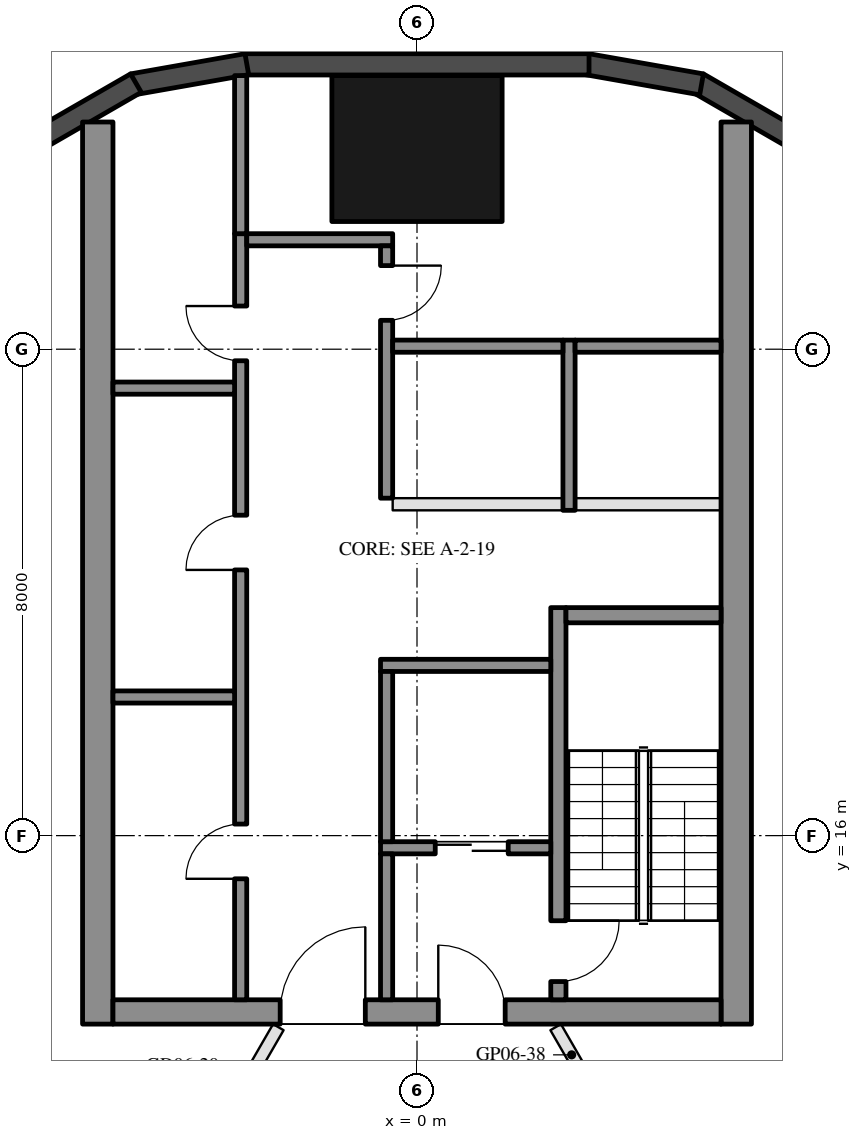
"""IFC4 building model, lengths in metres.
Left out: names, types, materials, properties, quantities, classifications, styles, units other than length and angle.
Written with IfcOpenShell. Run it as: python <this file> out.ifc"""

import sys

from ifc_helpers import new_model, si_unit, direction, frame, frame_2d, origin, origin_2d, place, context, subcontext, project, spatial, rectangle, hollow_rectangle, extrude, element, fill, save


model = new_model("IFC4")
c1 = context("Model", 3, precision=1e-05, world=origin(), true_north=direction((0.0, 1.0)))
c2 = subcontext(c1, "Body", "Model", "MODEL_VIEW")
j1 = project(units=[si_unit("LENGTHUNIT", "METRE"), si_unit("PLANEANGLEUNIT", "RADIAN")], contexts=[c1])
p1 = place(None, origin())
s1 = spatial("IfcSite", under=j1, at=p1, CompositionType="ELEMENT")
p2 = place(p1, origin())
s2 = spatial("IfcBuilding", under=s1, at=p2, CompositionType="ELEMENT")
p3 = place(p2, frame((0.0, 0.0, 90.9)))
s3 = spatial("IfcBuildingStorey", under=s2, at=p3, CompositionType="ELEMENT", Elevation=90.9)
p4 = place(p3, frame((0.0, 27.3, 0.0), z_axis=(0.0, 0.0, 1.0), x_axis=(1.0, 0.0, 0.0)))
e1 = element("IfcColumn", 1, at=p4, inside=s3, PredefinedType="COLUMN", context=c2, shape_type="SweptSolid", body=[
    extrude(hollow_rectangle(XDim=2.8, YDim=2.4, WallThickness=0.07, at=origin_2d()), origin(), (0.0, 0.0, 1.0), 3.7),
])
for number, where, z_axis, x_axis in (
    (2, (6.277, 27.422, 0.0), (0.0, 0.0, 1.0), (-0.866, 0.5, 0.0)),
    (3, (4.68, 28.356, 0.0), (0.0, 0.0, 1.0), (-0.985, 0.174, 0.0)),
):
    element("IfcWall", number, at=place(p3, frame(where, z_axis=z_axis, x_axis=x_axis)), inside=s3, PredefinedType="SOLIDWALL", context=c2, shape_type="SweptSolid", body=[
        extrude(rectangle(XDim=1.91, YDim=0.35, at=frame_2d((0.955, 0.0))), origin(), (0.0, 0.0, 1.0), 3.55),
    ])
p5 = place(p3, frame((2.829, 28.685, 0.0), z_axis=(0.0, 0.0, 1.0), x_axis=(-1.0, 0.0, 0.0)))
e4 = element("IfcWall", 4, at=p5, inside=s3, PredefinedType="SOLIDWALL", context=c2, shape_type="SweptSolid", body=[
    extrude(rectangle(XDim=5.658, YDim=0.35, at=frame_2d((2.829, 0.0))), origin(), (0.0, 0.0, 1.0), 3.55),
])
for number, where, z_axis, x_axis in (
    (5, (-2.799, 28.688, 0.0), (0.0, 0.0, 1.0), (-0.985, -0.174, 0.0)),
    (6, (-4.623, 28.377, 0.0), (0.0, 0.0, 1.0), (-0.866, -0.5, 0.0)),
):
    element("IfcWall", number, at=place(p3, frame(where, z_axis=z_axis, x_axis=x_axis)), inside=s3, PredefinedType="SOLIDWALL", context=c2, shape_type="SweptSolid", body=[
        extrude(rectangle(XDim=1.91, YDim=0.35, at=frame_2d((0.955, 0.0))), origin(), (0.0, 0.0, 1.0), 3.55),
    ])
for number, where, z_axis, x_axis in (
    (7, (5.25, 12.9, 0.0), (0.0, 0.0, 1.0), (0.0, 1.0, 0.0)),
    (8, (-5.25, 12.9, 0.0), (0.0, 0.0, 1.0), (0.0, 1.0, 0.0)),
):
    element("IfcWall", number, at=place(p3, frame(where, z_axis=z_axis, x_axis=x_axis)), inside=s3, PredefinedType="SHEAR", context=c2, shape_type="SweptSolid", body=[
        extrude(rectangle(XDim=14.837, YDim=0.5, at=frame_2d((7.418, 0.0))), origin(), (0.0, 0.0, 1.0), 3.5),
    ])
p6 = place(p3, frame((5.0, 13.1, 0.0), z_axis=(0.0, 0.0, 1.0), x_axis=(-1.0, 0.0, 0.0)))
e9 = element("IfcWall", 9, at=p6, inside=s3, PredefinedType="SHEAR", context=c2, shape_type="SweptSolid", body=[
    extrude(rectangle(XDim=10.0, YDim=0.4, at=frame_2d((5.0, 0.0))), origin(), (0.0, 0.0, 1.0), 3.5),
])
p7 = place(p6, frame((3.55, 0.0, 0.0)))
e10 = element("IfcOpeningElement", 10, at=p7, cuts=e9, PredefinedType="OPENING", context=c2, shape_type="SweptSolid", body=[
    extrude(rectangle(XDim=1.1, YDim=2.1, at=frame_2d((0.55, 1.05))), frame((0.0, 0.21, 0.0), z_axis=(0.0, -1.0, 0.0), x_axis=(1.0, 0.0, 0.0)), (0.0, 0.0, 1.0), 0.42),
])
p8 = place(p6, frame((5.85, 0.0, 0.0)))
e11 = element("IfcOpeningElement", 11, at=p8, cuts=e9, PredefinedType="OPENING", context=c2, shape_type="SweptSolid", body=[
    extrude(rectangle(XDim=1.4, YDim=2.1, at=frame_2d((0.7, 1.05))), frame((0.0, 0.21, 0.0), z_axis=(0.0, -1.0, 0.0), x_axis=(1.0, 0.0, 0.0)), (0.0, 0.0, 1.0), 0.42),
])
p9 = place(p3, frame((2.325, 13.3, 0.0), z_axis=(0.0, 0.0, 1.0), x_axis=(0.0, 1.0, 0.0)))
e12 = element("IfcWall", 12, at=p9, inside=s3, PredefinedType="SHEAR", context=c2, shape_type="SweptSolid", body=[
    extrude(rectangle(XDim=6.45, YDim=0.25, at=frame_2d((3.225, 0.0))), origin(), (0.0, 0.0, 1.0), 3.5),
])
p10 = place(p9, frame((0.3, 0.0, 0.0)))
e13 = element("IfcOpeningElement", 13, at=p10, cuts=e12, PredefinedType="OPENING", context=c2, shape_type="SweptSolid", body=[
    extrude(rectangle(XDim=1.0, YDim=2.1, at=frame_2d((0.5, 1.05))), frame((0.0, 0.135, 0.0), z_axis=(0.0, -1.0, 0.0), x_axis=(1.0, 0.0, 0.0)), (0.0, 0.0, 1.0), 0.27),
])
p11 = place(p3, frame((5.0, 19.625, 0.0), z_axis=(0.0, 0.0, 1.0), x_axis=(-1.0, 0.0, 0.0)))
e14 = element("IfcWall", 14, at=p11, inside=s3, PredefinedType="SHEAR", context=c2, shape_type="SweptSolid", body=[
    extrude(rectangle(XDim=2.55, YDim=0.25, at=frame_2d((1.275, 0.0))), origin(), (0.0, 0.0, 1.0), 3.5),
])
p12 = place(p3, frame((2.2, 18.8, 0.0), z_axis=(0.0, 0.0, 1.0), x_axis=(-1.0, 0.0, 0.0)))
e15 = element("IfcWall", 15, at=p12, inside=s3, PredefinedType="SHEAR", context=c2, shape_type="SweptSolid", body=[
    extrude(rectangle(XDim=2.8, YDim=0.2, at=frame_2d((1.4, 0.0))), origin(), (0.0, 0.0, 1.0), 3.5),
])
p13 = place(p3, frame((2.2, 15.8, 0.0), z_axis=(0.0, 0.0, 1.0), x_axis=(-1.0, 0.0, 0.0)))
e16 = element("IfcWall", 16, at=p13, inside=s3, PredefinedType="SHEAR", context=c2, shape_type="SweptSolid", body=[
    extrude(rectangle(XDim=2.8, YDim=0.2, at=frame_2d((1.4, 0.0))), origin(), (0.0, 0.0, 1.0), 3.5),
])
p14 = place(p13, frame((0.7, 0.0, 0.0)))
e17 = element("IfcOpeningElement", 17, at=p14, cuts=e16, PredefinedType="OPENING", context=c2, shape_type="SweptSolid", body=[
    extrude(rectangle(XDim=1.2, YDim=2.1, at=frame_2d((0.6, 1.05))), frame((0.0, 0.11, 0.0), z_axis=(0.0, -1.0, 0.0), x_axis=(1.0, 0.0, 0.0)), (0.0, 0.0, 1.0), 0.22),
])
p15 = place(p3, frame((-0.5, 15.9, 0.0), z_axis=(0.0, 0.0, 1.0), x_axis=(0.0, 1.0, 0.0)))
e18 = element("IfcWall", 18, at=p15, inside=s3, PredefinedType="SHEAR", context=c2, shape_type="SweptSolid", body=[
    extrude(rectangle(XDim=2.8, YDim=0.2, at=frame_2d((1.4, 0.0))), origin(), (0.0, 0.0, 1.0), 3.5),
])
p16 = place(p3, frame((-0.5, 13.3, 0.0), z_axis=(0.0, 0.0, 1.0), x_axis=(0.0, 1.0, 0.0)))
e19 = element("IfcWall", 19, at=p16, inside=s3, PredefinedType="SHEAR", context=c2, shape_type="SweptSolid", body=[
    extrude(rectangle(XDim=2.4, YDim=0.2, at=frame_2d((1.2, 0.0))), origin(), (0.0, 0.0, 1.0), 3.5),
])
p17 = place(p3, frame((-2.9, 13.3, 0.0), z_axis=(0.0, 0.0, 1.0), x_axis=(0.0, 1.0, 0.0)))
e20 = element("IfcWall", 20, at=p17, inside=s3, PredefinedType="SHEAR", context=c2, shape_type="SweptSolid", body=[
    extrude(rectangle(XDim=12.6, YDim=0.2, at=frame_2d((6.3, 0.0))), origin(), (0.0, 0.0, 1.0), 3.5),
])
p18 = place(p17, frame((1.99, 0.0, 0.0)))
e21 = element("IfcOpeningElement", 21, at=p18, cuts=e20, PredefinedType="OPENING", context=c2, shape_type="SweptSolid", body=[
    extrude(rectangle(XDim=0.9, YDim=2.1, at=frame_2d((0.45, 1.05))), frame((0.0, 0.11, 0.0), z_axis=(0.0, -1.0, 0.0), x_axis=(1.0, 0.0, 0.0)), (0.0, 0.0, 1.0), 0.22),
])
p19 = place(p17, frame((7.07, 0.0, 0.0)))
e22 = element("IfcOpeningElement", 22, at=p19, cuts=e20, PredefinedType="OPENING", context=c2, shape_type="SweptSolid", body=[
    extrude(rectangle(XDim=0.9, YDim=2.1, at=frame_2d((0.45, 1.05))), frame((0.0, 0.11, 0.0), z_axis=(0.0, -1.0, 0.0), x_axis=(1.0, 0.0, 0.0)), (0.0, 0.0, 1.0), 0.22),
])
p20 = place(p17, frame((10.51, 0.0, 0.0)))
e23 = element("IfcOpeningElement", 23, at=p20, cuts=e20, PredefinedType="OPENING", context=c2, shape_type="SweptSolid", body=[
    extrude(rectangle(XDim=0.9, YDim=2.1, at=frame_2d((0.45, 1.05))), frame((0.0, 0.11, 0.0), z_axis=(0.0, -1.0, 0.0), x_axis=(1.0, 0.0, 0.0)), (0.0, 0.0, 1.0), 0.22),
])
p21 = place(p3, frame((-0.4, 25.8, 0.0), z_axis=(0.0, 0.0, 1.0), x_axis=(-1.0, 0.0, 0.0)))
e24 = element("IfcWall", 24, at=p21, inside=s3, PredefinedType="SHEAR", context=c2, shape_type="SweptSolid", body=[
    extrude(rectangle(XDim=2.4, YDim=0.2, at=frame_2d((1.2, 0.0))), origin(), (0.0, 0.0, 1.0), 3.5),
])
p22 = place(p3, frame((-0.5, 21.55, 0.0), z_axis=(0.0, 0.0, 1.0), x_axis=(0.0, 1.0, 0.0)))
e25 = element("IfcWall", 25, at=p22, inside=s3, PredefinedType="SHEAR", context=c2, shape_type="SweptSolid", body=[
    extrude(rectangle(XDim=4.15, YDim=0.2, at=frame_2d((2.075, 0.0))), origin(), (0.0, 0.0, 1.0), 3.5),
])
p23 = place(p22, frame((2.925, 0.0, 0.0)))
e26 = element("IfcOpeningElement", 26, at=p23, cuts=e25, PredefinedType="OPENING", context=c2, shape_type="SweptSolid", body=[
    extrude(rectangle(XDim=0.9, YDim=2.1, at=frame_2d((0.45, 1.05))), frame((0.0, 0.11, 0.0), z_axis=(0.0, -1.0, 0.0), x_axis=(1.0, 0.0, 0.0)), (0.0, 0.0, 1.0), 0.22),
])
for number, where, z_axis, x_axis in (
    (27, (-3.0, 18.28, 0.0), (0.0, 0.0, 1.0), (-1.0, 0.0, 0.0)),
    (28, (-3.0, 23.36, 0.0), (0.0, 0.0, 1.0), (-1.0, 0.0, 0.0)),
):
    element("IfcWall", number, at=place(p3, frame(where, z_axis=z_axis, x_axis=x_axis)), inside=s3, PredefinedType="SHEAR", context=c2, shape_type="SweptSolid", body=[
        extrude(rectangle(XDim=2.0, YDim=0.2, at=frame_2d((1.0, 0.0))), origin(), (0.0, 0.0, 1.0), 3.5),
    ])
p24 = place(p3, frame((-2.9, 25.9, 0.0), z_axis=(0.0, 0.0, 1.0), x_axis=(0.0, 1.0, 0.0)))
e29 = element("IfcWall", 29, at=p24, inside=s3, PredefinedType="SHEAR", context=c2, shape_type="SweptSolid", body=[
    extrude(rectangle(XDim=2.6, YDim=0.2, at=frame_2d((1.3, 0.0))), origin(), (0.0, 0.0, 1.0), 3.5),
])
p25 = place(p3, frame((2.5, 21.35, 0.0), z_axis=(0.0, 0.0, 1.0), x_axis=(0.0, 1.0, 0.0)))
e30 = element("IfcWall", 30, at=p25, inside=s3, PredefinedType="SHEAR", context=c2, shape_type="SweptSolid", body=[
    extrude(rectangle(XDim=2.8, YDim=0.2, at=frame_2d((1.4, 0.0))), origin(), (0.0, 0.0, 1.0), 3.5),
])
p26 = place(p3, frame((5.0, 24.05, 0.0), z_axis=(0.0, 0.0, 1.0), x_axis=(-1.0, 0.0, 0.0)))
e31 = element("IfcWall", 31, at=p26, inside=s3, PredefinedType="SHEAR", context=c2, shape_type="SweptSolid", body=[
    extrude(rectangle(XDim=2.4, YDim=0.2, at=frame_2d((1.2, 0.0))), origin(), (0.0, 0.0, 1.0), 3.5),
])
p27 = place(p3, frame((2.4, 24.05, 0.0), z_axis=(0.0, 0.0, 1.0), x_axis=(-1.0, 0.0, 0.0)))
e32 = element("IfcWall", 32, at=p27, inside=s3, PredefinedType="SHEAR", context=c2, shape_type="SweptSolid", body=[
    extrude(rectangle(XDim=2.8, YDim=0.2, at=frame_2d((1.4, 0.0))), origin(), (0.0, 0.0, 1.0), 3.5),
])
p28 = place(p3, frame((5.0, 21.45, 0.0), z_axis=(0.0, 0.0, 1.0), x_axis=(-1.0, 0.0, 0.0)))
e33 = element("IfcWall", 33, at=p28, inside=s3, PredefinedType="PARTITIONING", context=c2, shape_type="SweptSolid", body=[
    extrude(rectangle(XDim=2.4, YDim=0.2, at=frame_2d((1.2, 0.0))), origin(), (0.0, 0.0, 1.0), 3.5),
])
p29 = place(p3, frame((2.4, 21.45, 0.0), z_axis=(0.0, 0.0, 1.0), x_axis=(-1.0, 0.0, 0.0)))
e34 = element("IfcWall", 34, at=p29, inside=s3, PredefinedType="PARTITIONING", context=c2, shape_type="SweptSolid", body=[
    extrude(rectangle(XDim=2.8, YDim=0.2, at=frame_2d((1.4, 0.0))), origin(), (0.0, 0.0, 1.0), 3.5),
])
p30 = place(p3, frame((14.222, 13.927, 0.0), z_axis=(0.0, 0.0, 1.0), x_axis=(-0.890385282198, -0.455207699017, 0.0)))
e35 = element("IfcWall", 35, at=p30, inside=s3, PredefinedType="PARTITIONING", context=c2, shape_type="SweptSolid", body=[
    extrude(rectangle(XDim=10.994, YDim=0.2, at=frame_2d((5.497, 0.0))), origin(), (0.0, 0.0, 1.0), 2.96),
])
p31 = place(p3, frame((-13.192, 13.91, 0.0), z_axis=(0.0, 0.0, 1.0), x_axis=(0.892469554868, -0.451107629766, 0.0)))
e36 = element("IfcWall", 36, at=p31, inside=s3, PredefinedType="PARTITIONING", context=c2, shape_type="SweptSolid", body=[
    extrude(rectangle(XDim=10.096, YDim=0.2, at=frame_2d((5.048, 0.0))), origin(), (0.0, 0.0, 1.0), 2.96),
])
p32 = place(p3, frame((2.281, 12.85, 0.0), z_axis=(0.0, 0.0, 1.0), x_axis=(0.499973180286, -0.8660408876, 0.0)))
e37 = element("IfcWall", 37, at=p32, inside=s3, PredefinedType="PARTITIONING", context=c2, shape_type="SweptSolid", body=[
    extrude(rectangle(XDim=4.383, YDim=0.2, at=frame_2d((2.191, 0.0))), origin(), (0.0, 0.0, 1.0), 2.95),
])
p33 = place(p32, frame((1.691, 0.0, 0.0)))
e38 = element("IfcOpeningElement", 38, at=p33, cuts=e37, PredefinedType="OPENING", context=c2, shape_type="SweptSolid", body=[
    extrude(rectangle(XDim=1.0, YDim=2.1, at=frame_2d((0.5, 1.05))), frame((0.0, 0.11, 0.0), z_axis=(0.0, -1.0, 0.0), x_axis=(1.0, 0.0, 0.0)), (0.0, 0.0, 1.0), 0.22),
])
p34 = place(p3, frame((-4.222, 9.488, 0.0), z_axis=(0.0, 0.0, 1.0), x_axis=(0.49998736472, 0.866032698644, 0.0)))
e39 = element("IfcWall", 39, at=p34, inside=s3, PredefinedType="PARTITIONING", context=c2, shape_type="SweptSolid", body=[
    extrude(rectangle(XDim=3.882, YDim=0.2, at=frame_2d((1.941, 0.0))), origin(), (0.0, 0.0, 1.0), 2.95),
])
p35 = place(p34, frame((1.441, 0.0, 0.0)))
e40 = element("IfcOpeningElement", 40, at=p35, cuts=e39, PredefinedType="OPENING", context=c2, shape_type="SweptSolid", body=[
    extrude(rectangle(XDim=1.0, YDim=2.1, at=frame_2d((0.5, 1.05))), frame((0.0, 0.11, 0.0), z_axis=(0.0, -1.0, 0.0), x_axis=(1.0, 0.0, 0.0)), (0.0, 0.0, 1.0), 0.22),
])
p36 = place(p14, origin())
e41 = element("IfcDoor", 41, at=p36, inside=s3, OperationType="DOUBLE_DOOR_SLIDING", PredefinedType="DOOR", context=c2, shape_type="SweptSolid", body=[
    extrude(rectangle(XDim=1.2, YDim=2.1, at=frame_2d((0.6, 1.05))), frame((0.0, 0.025, 0.0), z_axis=(0.0, -1.0, 0.0), x_axis=(1.0, 0.0, 0.0)), (0.0, 0.0, 1.0), 0.05),
])
fill(e17, e41)
p37 = place(p18, origin())
e42 = element("IfcDoor", 42, at=p37, inside=s3, OperationType="SINGLE_SWING_LEFT", PredefinedType="DOOR", context=c2, shape_type="SweptSolid", body=[
    extrude(rectangle(XDim=0.9, YDim=2.1, at=frame_2d((0.45, 1.05))), frame((0.0, 0.025, 0.0), z_axis=(0.0, -1.0, 0.0), x_axis=(1.0, 0.0, 0.0)), (0.0, 0.0, 1.0), 0.05),
])
fill(e21, e42)
p38 = place(p19, origin())
e43 = element("IfcDoor", 43, at=p38, inside=s3, OperationType="SINGLE_SWING_LEFT", PredefinedType="DOOR", context=c2, shape_type="SweptSolid", body=[
    extrude(rectangle(XDim=0.9, YDim=2.1, at=frame_2d((0.45, 1.05))), frame((0.0, 0.025, 0.0), z_axis=(0.0, -1.0, 0.0), x_axis=(1.0, 0.0, 0.0)), (0.0, 0.0, 1.0), 0.05),
])
fill(e22, e43)
p39 = place(p20, origin())
e44 = element("IfcDoor", 44, at=p39, inside=s3, OperationType="SINGLE_SWING_RIGHT", PredefinedType="DOOR", context=c2, shape_type="SweptSolid", body=[
    extrude(rectangle(XDim=0.9, YDim=2.1, at=frame_2d((0.45, 1.05))), frame((0.0, 0.025, 0.0), z_axis=(0.0, -1.0, 0.0), x_axis=(1.0, 0.0, 0.0)), (0.0, 0.0, 1.0), 0.05),
])
fill(e23, e44)
p40 = place(p23, frame((0.9, 0.0, 0.0), z_axis=(0.0, 0.0, 1.0), x_axis=(-1.0, 0.0, 0.0)))
e45 = element("IfcDoor", 45, at=p40, inside=s3, OperationType="SINGLE_SWING_LEFT", PredefinedType="DOOR", context=c2, shape_type="SweptSolid", body=[
    extrude(rectangle(XDim=0.9, YDim=2.1, at=frame_2d((0.45, 1.05))), frame((0.0, 0.025, 0.0), z_axis=(0.0, -1.0, 0.0), x_axis=(1.0, 0.0, 0.0)), (0.0, 0.0, 1.0), 0.05),
])
fill(e26, e45)
p41 = place(p7, frame((1.1, 0.0, 0.0), z_axis=(0.0, 0.0, 1.0), x_axis=(-1.0, 0.0, 0.0)))
e46 = element("IfcDoor", 46, at=p41, inside=s3, OperationType="SINGLE_SWING_LEFT", PredefinedType="DOOR", context=c2, shape_type="SweptSolid", body=[
    extrude(rectangle(XDim=1.1, YDim=2.1, at=frame_2d((0.55, 1.05))), frame((0.0, 0.025, 0.0), z_axis=(0.0, -1.0, 0.0), x_axis=(1.0, 0.0, 0.0)), (0.0, 0.0, 1.0), 0.05),
])
fill(e10, e46)
p42 = place(p8, frame((1.4, 0.0, 0.0), z_axis=(0.0, 0.0, 1.0), x_axis=(-1.0, 0.0, 0.0)))
e47 = element("IfcDoor", 47, at=p42, inside=s3, OperationType="DOUBLE_DOOR_SINGLE_SWING", PredefinedType="DOOR", context=c2, shape_type="SweptSolid", body=[
    extrude(rectangle(XDim=1.4, YDim=2.1, at=frame_2d((0.7, 1.05))), frame((0.0, 0.025, 0.0), z_axis=(0.0, -1.0, 0.0), x_axis=(1.0, 0.0, 0.0)), (0.0, 0.0, 1.0), 0.05),
])
fill(e11, e47)
p43 = place(p10, frame((1.0, 0.0, 0.0), z_axis=(0.0, 0.0, 1.0), x_axis=(-1.0, 0.0, 0.0)))
e48 = element("IfcDoor", 48, at=p43, inside=s3, OperationType="SINGLE_SWING_LEFT", PredefinedType="DOOR", context=c2, shape_type="SweptSolid", body=[
    extrude(rectangle(XDim=1.0, YDim=2.1, at=frame_2d((0.5, 1.05))), frame((0.0, 0.025, 0.0), z_axis=(0.0, -1.0, 0.0), x_axis=(1.0, 0.0, 0.0)), (0.0, 0.0, 1.0), 0.05),
])
fill(e13, e48)
save(model, sys.argv[1])
